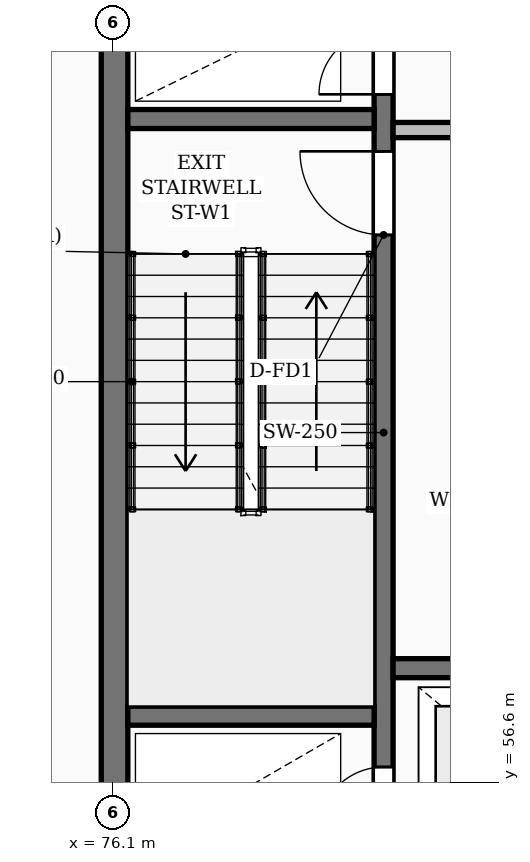
"""IFC4 building model, lengths in metres.
Left out: names, types, materials, properties, quantities, classifications, styles, units other than length and angle.
Written with IfcOpenShell. Run it as: python <this file> out.ifc"""

import sys

from ifc_helpers import new_model, si_unit, direction, frame, frame_2d, origin, place, context, subcontext, project, spatial, rectangle, extrude, element, fill, save


model = new_model("IFC4")
c1 = context("Model", 3, precision=1e-05, world=origin(), true_north=direction((0.0, 1.0)))
c2 = subcontext(c1, "Body", "Model", "MODEL_VIEW")
j1 = project(units=[si_unit("LENGTHUNIT", "METRE"), si_unit("PLANEANGLEUNIT", "RADIAN")], contexts=[c1])
p1 = place(None, origin())
s1 = spatial("IfcSite", under=j1, at=p1, CompositionType="ELEMENT")
p2 = place(p1, origin())
s2 = spatial("IfcBuilding", under=s1, at=p2, CompositionType="ELEMENT")
p3 = place(p2, frame((0.0, 0.0, 5.4)))
s3 = spatial("IfcBuildingStorey", under=s2, at=p3, CompositionType="ELEMENT", Elevation=5.4)
p4 = place(p3, frame((76.125, 55.375, 0.0), z_axis=(0.0, 0.0, 1.0), x_axis=(0.0, 1.0, 0.0)))
e1 = element("IfcWall", 1, at=p4, inside=s3, PredefinedType="SHEAR", context=c2, shape_type="SweptSolid", body=[
    extrude(rectangle(XDim=11.65, YDim=0.35, at=frame_2d((5.825, 0.0))), origin(), (0.0, 0.0, 1.0), 4.6),
])
p5 = place(p3, frame((79.665, 55.4, 0.0), z_axis=(0.0, 0.0, 1.0), x_axis=(0.0, 1.0, 0.0)))
e2 = element("IfcWall", 2, at=p5, inside=s3, PredefinedType="SHEAR", context=c2, shape_type="SweptSolid", body=[
    extrude(rectangle(XDim=11.6, YDim=0.25, at=frame_2d((5.8, 0.0))), origin(), (0.0, 0.0, 1.0), 4.6),
])
p6 = place(p5, frame((0.55, 0.0, 0.0)))
e3 = element("IfcOpeningElement", 3, at=p6, cuts=e2, PredefinedType="OPENING", context=c2, shape_type="SweptSolid", body=[
    extrude(rectangle(XDim=0.85, YDim=2.05, at=frame_2d((0.425, 1.025))), frame((0.0, 0.135, 0.0), z_axis=(0.0, -1.0, 0.0), x_axis=(1.0, 0.0, 0.0)), (0.0, 0.0, 1.0), 0.27),
])
p7 = place(p5, frame((8.4, 0.0, 0.0)))
e4 = element("IfcOpeningElement", 4, at=p7, cuts=e2, PredefinedType="OPENING", context=c2, shape_type="SweptSolid", body=[
    extrude(rectangle(XDim=1.1, YDim=2.1, at=frame_2d((0.55, 1.05))), frame((0.0, 0.135, 0.0), z_axis=(0.0, -1.0, 0.0), x_axis=(1.0, 0.0, 0.0)), (0.0, 0.0, 1.0), 0.27),
])
p8 = place(p5, frame((10.25, 0.0, 0.0)))
e5 = element("IfcOpeningElement", 5, at=p8, cuts=e2, PredefinedType="OPENING", context=c2, shape_type="SweptSolid", body=[
    extrude(rectangle(XDim=0.85, YDim=2.05, at=frame_2d((0.425, 1.025))), frame((0.0, 0.135, 0.0), z_axis=(0.0, -1.0, 0.0), x_axis=(1.0, 0.0, 0.0)), (0.0, 0.0, 1.0), 0.27),
])
for number, where, z_axis, x_axis in (
    (6, (76.3, 57.475, 0.0), (0.0, 0.0, 1.0), (1.0, 0.0, 0.0)),
    (7, (76.3, 65.325, 0.0), (0.0, 0.0, 1.0), (1.0, 0.0, 0.0)),
):
    element("IfcWall", number, at=place(p3, frame(where, z_axis=z_axis, x_axis=x_axis)), inside=s3, PredefinedType="SHEAR", context=c2, shape_type="SweptSolid", body=[
        extrude(rectangle(XDim=3.24, YDim=0.25, at=frame_2d((1.62, 0.0))), origin(), (0.0, 0.0, 1.0), 4.6),
    ])
p9 = place(p3, frame((79.79, 58.1, 0.0), z_axis=(0.0, 0.0, 1.0), x_axis=(1.0, 0.0, 0.0)))
e8 = element("IfcWall", 8, at=p9, inside=s3, PredefinedType="SHEAR", context=c2, shape_type="SweptSolid", body=[
    extrude(rectangle(XDim=4.39, YDim=0.25, at=frame_2d((2.195, 0.0))), origin(), (0.0, 0.0, 1.0), 4.6),
])
p10 = place(p9, frame((1.05, 0.0, 0.0)))
e9 = element("IfcOpeningElement", 9, at=p10, cuts=e8, PredefinedType="OPENING", context=c2, shape_type="SweptSolid", body=[
    extrude(rectangle(XDim=1.12, YDim=2.12, at=frame_2d((0.56, 1.06))), frame((0.0, 0.135, 0.0), z_axis=(0.0, -1.0, 0.0), x_axis=(1.0, 0.0, 0.0)), (0.0, 0.0, 1.0), 0.27),
])
p11 = place(p9, frame((3.26, 0.0, 0.0)))
e10 = element("IfcOpeningElement", 10, at=p11, cuts=e8, PredefinedType="OPENING", context=c2, shape_type="SweptSolid", body=[
    extrude(rectangle(XDim=0.85, YDim=2.05, at=frame_2d((0.425, 1.025))), frame((0.0, 0.135, 0.0), z_axis=(0.0, -1.0, 0.0), x_axis=(1.0, 0.0, 0.0)), (0.0, 0.0, 1.0), 0.27),
])
p12 = place(p3, frame((79.79, 65.18, 0.0), z_axis=(0.0, 0.0, 1.0), x_axis=(1.0, 0.0, 0.0)))
e11 = element("IfcWall", 11, at=p12, inside=s3, PredefinedType="PARTITIONING", context=c2, shape_type="SweptSolid", body=[
    extrude(rectangle(XDim=4.39, YDim=0.2, at=frame_2d((2.195, 0.0))), origin(), (0.0, 0.0, 1.0), 4.3),
])
p13 = place(p12, frame((1.5, 0.0, 0.0)))
e12 = element("IfcOpeningElement", 12, at=p13, cuts=e11, PredefinedType="OPENING", context=c2, shape_type="SweptSolid", body=[
    extrude(rectangle(XDim=1.1, YDim=2.1, at=frame_2d((0.55, 1.05))), frame((0.0, 0.11, 0.0), z_axis=(0.0, -1.0, 0.0), x_axis=(1.0, 0.0, 0.0)), (0.0, 0.0, 1.0), 0.22),
])
p14 = place(p6, origin())
e13 = element("IfcDoor", 13, at=p14, inside=s3, OperationType="SINGLE_SWING_LEFT", PredefinedType="DOOR", context=c2, shape_type="SweptSolid", body=[
    extrude(rectangle(XDim=0.85, YDim=2.05, at=frame_2d((0.425, 1.025))), frame((0.0, 0.025, 0.0), z_axis=(0.0, -1.0, 0.0), x_axis=(1.0, 0.0, 0.0)), (0.0, 0.0, 1.0), 0.05),
])
fill(e3, e13)
p15 = place(p7, origin())
e14 = element("IfcDoor", 14, at=p15, inside=s3, OperationType="SINGLE_SWING_RIGHT", PredefinedType="DOOR", context=c2, shape_type="SweptSolid", body=[
    extrude(rectangle(XDim=1.1, YDim=2.1, at=frame_2d((0.55, 1.05))), frame((0.0, 0.025, 0.0), z_axis=(0.0, -1.0, 0.0), x_axis=(1.0, 0.0, 0.0)), (0.0, 0.0, 1.0), 0.05),
])
fill(e4, e14)
p16 = place(p8, origin())
e15 = element("IfcDoor", 15, at=p16, inside=s3, OperationType="SINGLE_SWING_LEFT", PredefinedType="DOOR", context=c2, shape_type="SweptSolid", body=[
    extrude(rectangle(XDim=0.85, YDim=2.05, at=frame_2d((0.425, 1.025))), frame((0.0, 0.025, 0.0), z_axis=(0.0, -1.0, 0.0), x_axis=(1.0, 0.0, 0.0)), (0.0, 0.0, 1.0), 0.05),
])
fill(e5, e15)
save(model, sys.argv[1])
